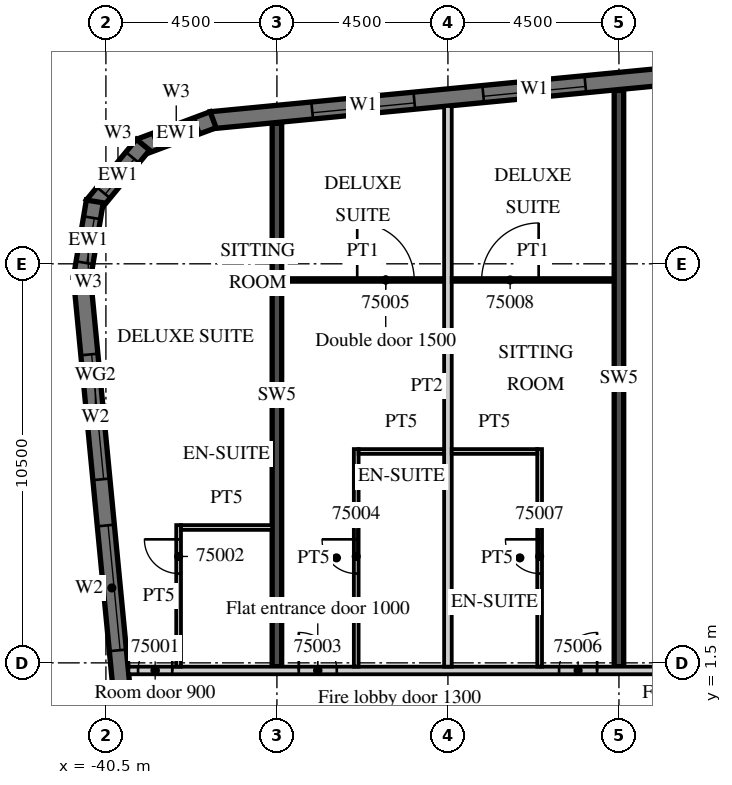
"""IFC4 building model, lengths in metres.
Left out: names, types, materials, properties, quantities, classifications, styles, units other than length and angle.
Written with IfcOpenShell. Run it as: python <this file> out.ifc"""

import sys

from ifc_helpers import new_model, si_unit, direction, frame, frame_2d, origin, place, context, subcontext, project, spatial, polyline, rectangle, outline, extrude, element, fill, save


model = new_model("IFC4")
c1 = context("Model", 3, precision=1e-05, world=origin(), true_north=direction((0.0, 1.0)))
c2 = subcontext(c1, "Body", "Model", "MODEL_VIEW")
j1 = project(units=[si_unit("LENGTHUNIT", "METRE"), si_unit("PLANEANGLEUNIT", "RADIAN")], contexts=[c1])
p1 = place(None, origin())
s1 = spatial("IfcSite", under=j1, at=p1, CompositionType="ELEMENT")
p2 = place(p1, origin())
s2 = spatial("IfcBuilding", under=s1, at=p2, CompositionType="ELEMENT")
p3 = place(p2, frame((0.0, 0.0, 298.2)))
s3 = spatial("IfcBuildingStorey", under=s2, at=p3, CompositionType="ELEMENT", Elevation=298.2)
p4 = place(p3, frame((-36.0, 1.4, 0.0), z_axis=(0.0, 0.0, 1.0), x_axis=(0.0, 1.0, 0.0)))
e1 = element("IfcWall", 1, at=p4, inside=s3, PredefinedType="SHEAR", context=c2, shape_type="SweptSolid", body=[
    extrude(rectangle(XDim=14.296, YDim=0.25, at=frame_2d((7.148, 0.0))), origin(), (0.0, 0.0, 1.0), 3.3),
])
p5 = place(p3, frame((-27.0, 1.4, 0.0), z_axis=(0.0, 0.0, 1.0), x_axis=(0.0, 1.0, 0.0)))
e2 = element("IfcWall", 2, at=p5, inside=s3, PredefinedType="SHEAR", context=c2, shape_type="SweptSolid", body=[
    extrude(rectangle(XDim=15.163, YDim=0.25, at=frame_2d((7.582, 0.0))), origin(), (0.0, 0.0, 1.0), 3.3),
])
p6 = place(p3, frame((-41.132, 11.658, 0.0), z_axis=(0.0, 0.0, 1.0), x_axis=(0.095847749461, -0.995396006082, 0.0)))
e3 = element("IfcWall", 3, at=p6, inside=s3, PredefinedType="SOLIDWALL", context=c2, shape_type="SweptSolid", body=[
    extrude(rectangle(XDim=32.0, YDim=0.45, at=frame_2d((16.0, 0.0))), origin(), (0.0, 0.0, 1.0), 3.02),
])
p7 = place(p6, frame((2.053, 0.0, 0.45)))
e4 = element("IfcOpeningElement", 4, at=p7, cuts=e3, PredefinedType="OPENING", context=c2, shape_type="SweptSolid", body=[
    extrude(rectangle(XDim=3.3, YDim=2.25, at=frame_2d((1.65, 1.125))), frame((0.0, 0.235, 0.0), z_axis=(0.0, -1.0, 0.0), x_axis=(1.0, 0.0, 0.0)), (0.0, 0.0, 1.0), 0.47),
])
p8 = place(p6, frame((6.574, 0.0, 0.45)))
e5 = element("IfcOpeningElement", 5, at=p8, cuts=e3, PredefinedType="OPENING", context=c2, shape_type="SweptSolid", body=[
    extrude(rectangle(XDim=3.3, YDim=2.25, at=frame_2d((1.65, 1.125))), frame((0.0, 0.235, 0.0), z_axis=(0.0, -1.0, 0.0), x_axis=(1.0, 0.0, 0.0)), (0.0, 0.0, 1.0), 0.47),
])
p9 = place(p3, frame((13.521, 20.713, 0.0), z_axis=(0.0, 0.0, 1.0), x_axis=(-0.995396277313, -0.095844932638, 0.0)))
e6 = element("IfcWall", 6, at=p9, inside=s3, PredefinedType="SOLIDWALL", context=c2, shape_type="SweptSolid", body=[
    extrude(rectangle(XDim=51.495, YDim=0.45, at=frame_2d((25.748, 0.0))), origin(), (0.0, 0.0, 1.0), 3.02),
])
p10 = place(p9, frame((0.91, 0.0, 0.45)))
e7 = element("IfcOpeningElement", 7, at=p10, cuts=e6, PredefinedType="OPENING", context=c2, shape_type="SweptSolid", body=[
    extrude(rectangle(XDim=2.7, YDim=2.25, at=frame_2d((1.35, 1.125))), frame((0.0, 0.235, 0.0), z_axis=(0.0, -1.0, 0.0), x_axis=(1.0, 0.0, 0.0)), (0.0, 0.0, 1.0), 0.47),
])
p11 = place(p9, frame((5.431, 0.0, 0.45)))
e8 = element("IfcOpeningElement", 8, at=p11, cuts=e6, PredefinedType="OPENING", context=c2, shape_type="SweptSolid", body=[
    extrude(rectangle(XDim=2.7, YDim=2.25, at=frame_2d((1.35, 1.125))), frame((0.0, 0.235, 0.0), z_axis=(0.0, -1.0, 0.0), x_axis=(1.0, 0.0, 0.0)), (0.0, 0.0, 1.0), 0.47),
])
p12 = place(p9, frame((9.952, 0.0, 0.45)))
e9 = element("IfcOpeningElement", 9, at=p12, cuts=e6, PredefinedType="OPENING", context=c2, shape_type="SweptSolid", body=[
    extrude(rectangle(XDim=2.7, YDim=2.25, at=frame_2d((1.35, 1.125))), frame((0.0, 0.235, 0.0), z_axis=(0.0, -1.0, 0.0), x_axis=(1.0, 0.0, 0.0)), (0.0, 0.0, 1.0), 0.47),
])
p13 = place(p9, frame((14.473, 0.0, 0.45)))
e10 = element("IfcOpeningElement", 10, at=p13, cuts=e6, PredefinedType="OPENING", context=c2, shape_type="SweptSolid", body=[
    extrude(rectangle(XDim=2.7, YDim=2.25, at=frame_2d((1.35, 1.125))), frame((0.0, 0.235, 0.0), z_axis=(0.0, -1.0, 0.0), x_axis=(1.0, 0.0, 0.0)), (0.0, 0.0, 1.0), 0.47),
])
p14 = place(p9, frame((18.994, 0.0, 0.45)))
e11 = element("IfcOpeningElement", 11, at=p14, cuts=e6, PredefinedType="OPENING", context=c2, shape_type="SweptSolid", body=[
    extrude(rectangle(XDim=2.7, YDim=2.25, at=frame_2d((1.35, 1.125))), frame((0.0, 0.235, 0.0), z_axis=(0.0, -1.0, 0.0), x_axis=(1.0, 0.0, 0.0)), (0.0, 0.0, 1.0), 0.47),
])
p15 = place(p9, frame((23.514, 0.0, 0.45)))
e12 = element("IfcOpeningElement", 12, at=p15, cuts=e6, PredefinedType="OPENING", context=c2, shape_type="SweptSolid", body=[
    extrude(rectangle(XDim=2.7, YDim=2.25, at=frame_2d((1.35, 1.125))), frame((0.0, 0.235, 0.0), z_axis=(0.0, -1.0, 0.0), x_axis=(1.0, 0.0, 0.0)), (0.0, 0.0, 1.0), 0.47),
])
p16 = place(p9, frame((28.035, 0.0, 0.45)))
e13 = element("IfcOpeningElement", 13, at=p16, cuts=e6, PredefinedType="OPENING", context=c2, shape_type="SweptSolid", body=[
    extrude(rectangle(XDim=2.7, YDim=2.25, at=frame_2d((1.35, 1.125))), frame((0.0, 0.235, 0.0), z_axis=(0.0, -1.0, 0.0), x_axis=(1.0, 0.0, 0.0)), (0.0, 0.0, 1.0), 0.47),
])
p17 = place(p9, frame((32.556, 0.0, 0.45)))
e14 = element("IfcOpeningElement", 14, at=p17, cuts=e6, PredefinedType="OPENING", context=c2, shape_type="SweptSolid", body=[
    extrude(rectangle(XDim=2.7, YDim=2.25, at=frame_2d((1.35, 1.125))), frame((0.0, 0.235, 0.0), z_axis=(0.0, -1.0, 0.0), x_axis=(1.0, 0.0, 0.0)), (0.0, 0.0, 1.0), 0.47),
])
p18 = place(p9, frame((37.077, 0.0, 0.45)))
e15 = element("IfcOpeningElement", 15, at=p18, cuts=e6, PredefinedType="OPENING", context=c2, shape_type="SweptSolid", body=[
    extrude(rectangle(XDim=2.7, YDim=2.25, at=frame_2d((1.35, 1.125))), frame((0.0, 0.235, 0.0), z_axis=(0.0, -1.0, 0.0), x_axis=(1.0, 0.0, 0.0)), (0.0, 0.0, 1.0), 0.47),
])
p19 = place(p9, frame((41.598, 0.0, 0.45)))
e16 = element("IfcOpeningElement", 16, at=p19, cuts=e6, PredefinedType="OPENING", context=c2, shape_type="SweptSolid", body=[
    extrude(rectangle(XDim=2.7, YDim=2.25, at=frame_2d((1.35, 1.125))), frame((0.0, 0.235, 0.0), z_axis=(0.0, -1.0, 0.0), x_axis=(1.0, 0.0, 0.0)), (0.0, 0.0, 1.0), 0.47),
])
p20 = place(p9, frame((46.118, 0.0, 0.45)))
e17 = element("IfcOpeningElement", 17, at=p20, cuts=e6, PredefinedType="OPENING", context=c2, shape_type="SweptSolid", body=[
    extrude(rectangle(XDim=2.7, YDim=2.25, at=frame_2d((1.35, 1.125))), frame((0.0, 0.235, 0.0), z_axis=(0.0, -1.0, 0.0), x_axis=(1.0, 0.0, 0.0)), (0.0, 0.0, 1.0), 0.47),
])
p21 = place(p3, frame((-37.679, 15.791, 0.0), z_axis=(0.0, 0.0, 1.0), x_axis=(-0.936677599948, -0.350192909346, 0.0)))
e18 = element("IfcWall", 18, at=p21, inside=s3, PredefinedType="SOLIDWALL", context=c2, shape_type="SweptSolid", body=[
    extrude(outline(polyline([(0.0, -0.225), (2.071, -0.225), (1.95, 0.225), (0.121, 0.225), (0.0, -0.225)])), origin(), (0.0, 0.0, 1.0), 3.02),
])
p22 = place(p21, frame((0.435, 0.0, 0.45)))
e19 = element("IfcOpeningElement", 19, at=p22, cuts=e18, PredefinedType="OPENING", context=c2, shape_type="SweptSolid", body=[
    extrude(rectangle(XDim=1.2, YDim=2.25, at=frame_2d((0.6, 1.125))), frame((0.0, 0.235, 0.0), z_axis=(0.0, -1.0, 0.0), x_axis=(1.0, 0.0, 0.0)), (0.0, 0.0, 1.0), 0.47),
])
p23 = place(p3, frame((-39.524, 15.133, 0.0), z_axis=(0.0, 0.0, 1.0), x_axis=(-0.636046112757, -0.771651049663, 0.0)))
e20 = element("IfcWall", 20, at=p23, inside=s3, PredefinedType="SOLIDWALL", context=c2, shape_type="SweptSolid", body=[
    extrude(outline(polyline([(0.0, -0.225), (2.071, -0.225), (1.95, 0.225), (0.121, 0.225), (0.0, -0.225)])), origin(), (0.0, 0.0, 1.0), 3.02),
])
p24 = place(p23, frame((0.435, 0.0, 0.45)))
e21 = element("IfcOpeningElement", 21, at=p24, cuts=e20, PredefinedType="OPENING", context=c2, shape_type="SweptSolid", body=[
    extrude(rectangle(XDim=1.2, YDim=2.25, at=frame_2d((0.6, 1.125))), frame((0.0, 0.235, 0.0), z_axis=(0.0, -1.0, 0.0), x_axis=(1.0, 0.0, 0.0)), (0.0, 0.0, 1.0), 0.47),
])
p25 = place(p3, frame((-40.792, 13.641, 0.0), z_axis=(0.0, 0.0, 1.0), x_axis=(-0.165068144653, -0.986282164302, 0.0)))
e22 = element("IfcWall", 22, at=p25, inside=s3, PredefinedType="SOLIDWALL", context=c2, shape_type="SweptSolid", body=[
    extrude(outline(polyline([(0.0, -0.225), (2.071, -0.225), (1.95, 0.225), (0.121, 0.225), (0.0, -0.225)])), origin(), (0.0, 0.0, 1.0), 3.02),
])
p26 = place(p25, frame((0.435, 0.0, 0.45)))
e23 = element("IfcOpeningElement", 23, at=p26, cuts=e22, PredefinedType="OPENING", context=c2, shape_type="SweptSolid", body=[
    extrude(rectangle(XDim=1.2, YDim=2.25, at=frame_2d((0.6, 1.125))), frame((0.0, 0.235, 0.0), z_axis=(0.0, -1.0, 0.0), x_axis=(1.0, 0.0, 0.0)), (0.0, 0.0, 1.0), 0.47),
])
p27 = place(p3, frame((-39.909, 1.3, 0.0), z_axis=(0.0, 0.0, 1.0), x_axis=(1.0, 0.0, 0.0)))
e24 = element("IfcWall", 24, at=p27, inside=s3, PredefinedType="PARTITIONING", context=c2, shape_type="SweptSolid", body=[
    extrude(rectangle(XDim=53.409, YDim=0.2, at=frame_2d((26.705, 0.0))), origin(), (0.0, 0.0, 1.0), 3.02),
])
p28 = place(p27, frame((0.255, 0.0, 0.0)))
e25 = element("IfcOpeningElement", 25, at=p28, cuts=e24, PredefinedType="OPENING", context=c2, shape_type="SweptSolid", body=[
    extrude(rectangle(XDim=0.9, YDim=2.1, at=frame_2d((0.45, 1.05))), frame((0.0, 0.11, 0.0), z_axis=(0.0, -1.0, 0.0), x_axis=(1.0, 0.0, 0.0)), (0.0, 0.0, 1.0), 0.22),
])
p29 = place(p27, frame((4.484, 0.0, 0.0)))
e26 = element("IfcOpeningElement", 26, at=p29, cuts=e24, PredefinedType="OPENING", context=c2, shape_type="SweptSolid", body=[
    extrude(rectangle(XDim=1.0, YDim=2.1, at=frame_2d((0.5, 1.05))), frame((0.0, 0.11, 0.0), z_axis=(0.0, -1.0, 0.0), x_axis=(1.0, 0.0, 0.0)), (0.0, 0.0, 1.0), 0.22),
])
p30 = place(p27, frame((11.334, 0.0, 0.0)))
e27 = element("IfcOpeningElement", 27, at=p30, cuts=e24, PredefinedType="OPENING", context=c2, shape_type="SweptSolid", body=[
    extrude(rectangle(XDim=1.0, YDim=2.1, at=frame_2d((0.5, 1.05))), frame((0.0, 0.11, 0.0), z_axis=(0.0, -1.0, 0.0), x_axis=(1.0, 0.0, 0.0)), (0.0, 0.0, 1.0), 0.22),
])
p31 = place(p27, frame((15.347, 0.0, 0.0)))
e28 = element("IfcOpeningElement", 28, at=p31, cuts=e24, PredefinedType="OPENING", context=c2, shape_type="SweptSolid", body=[
    extrude(rectangle(XDim=1.2, YDim=2.1, at=frame_2d((0.6, 1.05))), frame((0.0, 0.11, 0.0), z_axis=(0.0, -1.0, 0.0), x_axis=(1.0, 0.0, 0.0)), (0.0, 0.0, 1.0), 0.22),
])
p32 = place(p27, frame((24.859, 0.0, 0.0)))
e29 = element("IfcOpeningElement", 29, at=p32, cuts=e24, PredefinedType="OPENING", context=c2, shape_type="SweptSolid", body=[
    extrude(rectangle(XDim=1.0, YDim=2.1, at=frame_2d((0.5, 1.05))), frame((0.0, 0.11, 0.0), z_axis=(0.0, -1.0, 0.0), x_axis=(1.0, 0.0, 0.0)), (0.0, 0.0, 1.0), 0.22),
])
p33 = place(p27, frame((26.959, 0.0, 0.0)))
e30 = element("IfcOpeningElement", 30, at=p33, cuts=e24, PredefinedType="OPENING", context=c2, shape_type="SweptSolid", body=[
    extrude(rectangle(XDim=1.0, YDim=2.1, at=frame_2d((0.5, 1.05))), frame((0.0, 0.11, 0.0), z_axis=(0.0, -1.0, 0.0), x_axis=(1.0, 0.0, 0.0)), (0.0, 0.0, 1.0), 0.22),
])
p34 = place(p27, frame((33.346, 0.0, 0.0)))
e31 = element("IfcOpeningElement", 31, at=p34, cuts=e24, PredefinedType="OPENING", context=c2, shape_type="SweptSolid", body=[
    extrude(rectangle(XDim=1.2, YDim=2.1, at=frame_2d((0.6, 1.05))), frame((0.0, 0.11, 0.0), z_axis=(0.0, -1.0, 0.0), x_axis=(1.0, 0.0, 0.0)), (0.0, 0.0, 1.0), 0.22),
])
p35 = place(p27, frame((42.859, 0.0, 0.0)))
e32 = element("IfcOpeningElement", 32, at=p35, cuts=e24, PredefinedType="OPENING", context=c2, shape_type="SweptSolid", body=[
    extrude(rectangle(XDim=1.0, YDim=2.1, at=frame_2d((0.5, 1.05))), frame((0.0, 0.11, 0.0), z_axis=(0.0, -1.0, 0.0), x_axis=(1.0, 0.0, 0.0)), (0.0, 0.0, 1.0), 0.22),
])
p36 = place(p27, frame((44.959, 0.0, 0.0)))
e33 = element("IfcOpeningElement", 33, at=p36, cuts=e24, PredefinedType="OPENING", context=c2, shape_type="SweptSolid", body=[
    extrude(rectangle(XDim=1.0, YDim=2.1, at=frame_2d((0.5, 1.05))), frame((0.0, 0.11, 0.0), z_axis=(0.0, -1.0, 0.0), x_axis=(1.0, 0.0, 0.0)), (0.0, 0.0, 1.0), 0.22),
])
p37 = place(p27, frame((49.484, 0.0, 0.0)))
e34 = element("IfcOpeningElement", 34, at=p37, cuts=e24, PredefinedType="OPENING", context=c2, shape_type="SweptSolid", body=[
    extrude(rectangle(XDim=1.0, YDim=2.1, at=frame_2d((0.5, 1.05))), frame((0.0, 0.11, 0.0), z_axis=(0.0, -1.0, 0.0), x_axis=(1.0, 0.0, 0.0)), (0.0, 0.0, 1.0), 0.22),
])
p38 = place(p3, frame((-38.587, 1.4, 0.0), z_axis=(0.0, 0.0, 1.0), x_axis=(0.0, 1.0, 0.0)))
e35 = element("IfcWall", 35, at=p38, inside=s3, PredefinedType="PARTITIONING", context=c2, shape_type="SweptSolid", body=[
    extrude(rectangle(XDim=3.725, YDim=0.125, at=frame_2d((1.863, 0.0))), origin(), (0.0, 0.0, 1.0), 3.02),
])
p39 = place(p38, frame((2.45, 0.0, 0.0)))
e36 = element("IfcOpeningElement", 36, at=p39, cuts=e35, PredefinedType="OPENING", context=c2, shape_type="SweptSolid", body=[
    extrude(rectangle(XDim=0.9, YDim=2.1, at=frame_2d((0.45, 1.05))), frame((0.0, 0.073, 0.0), z_axis=(0.0, -1.0, 0.0), x_axis=(1.0, 0.0, 0.0)), (0.0, 0.0, 1.0), 0.145),
])
p40 = place(p3, frame((-38.525, 5.062, 0.0), z_axis=(0.0, 0.0, 1.0), x_axis=(1.0, 0.0, 0.0)))
e37 = element("IfcWall", 37, at=p40, inside=s3, PredefinedType="PARTITIONING", context=c2, shape_type="SweptSolid", body=[
    extrude(rectangle(XDim=2.4, YDim=0.125, at=frame_2d((1.2, 0.0))), origin(), (0.0, 0.0, 1.0), 3.02),
])
p41 = place(p3, frame((-31.5, 1.4, 0.0), z_axis=(0.0, 0.0, 1.0), x_axis=(0.0, 1.0, 0.0)))
e38 = element("IfcWall", 38, at=p41, inside=s3, PredefinedType="PARTITIONING", context=c2, shape_type="SweptSolid", body=[
    extrude(rectangle(XDim=14.752, YDim=0.2, at=frame_2d((7.376, 0.0))), origin(), (0.0, 0.0, 1.0), 3.02),
])
p42 = place(p3, frame((-33.913, 1.4, 0.0), z_axis=(0.0, 0.0, 1.0), x_axis=(0.0, 1.0, 0.0)))
e39 = element("IfcWall", 39, at=p42, inside=s3, PredefinedType="PARTITIONING", context=c2, shape_type="SweptSolid", body=[
    extrude(rectangle(XDim=5.725, YDim=0.125, at=frame_2d((2.863, 0.0))), origin(), (0.0, 0.0, 1.0), 3.02),
])
p43 = place(p42, frame((2.45, 0.0, 0.0)))
e40 = element("IfcOpeningElement", 40, at=p43, cuts=e39, PredefinedType="OPENING", context=c2, shape_type="SweptSolid", body=[
    extrude(rectangle(XDim=0.9, YDim=2.1, at=frame_2d((0.45, 1.05))), frame((0.0, 0.073, 0.0), z_axis=(0.0, -1.0, 0.0), x_axis=(1.0, 0.0, 0.0)), (0.0, 0.0, 1.0), 0.145),
])
p44 = place(p3, frame((-33.85, 7.062, 0.0), z_axis=(0.0, 0.0, 1.0), x_axis=(1.0, 0.0, 0.0)))
e41 = element("IfcWall", 41, at=p44, inside=s3, PredefinedType="PARTITIONING", context=c2, shape_type="SweptSolid", body=[
    extrude(rectangle(XDim=2.25, YDim=0.125, at=frame_2d((1.125, 0.0))), origin(), (0.0, 0.0, 1.0), 3.02),
])
p45 = place(p3, frame((-35.875, 11.575, 0.0), z_axis=(0.0, 0.0, 1.0), x_axis=(1.0, 0.0, 0.0)))
e42 = element("IfcWall", 42, at=p45, inside=s3, PredefinedType="PARTITIONING", context=c2, shape_type="SweptSolid", body=[
    extrude(rectangle(XDim=4.275, YDim=0.1, at=frame_2d((2.137, 0.0))), origin(), (0.0, 0.0, 1.0), 3.02),
])
p46 = place(p45, frame((1.988, 0.0, 0.0)))
e43 = element("IfcOpeningElement", 43, at=p46, cuts=e42, PredefinedType="OPENING", context=c2, shape_type="SweptSolid", body=[
    extrude(rectangle(XDim=1.5, YDim=2.1, at=frame_2d((0.75, 1.05))), frame((0.0, 0.06, 0.0), z_axis=(0.0, -1.0, 0.0), x_axis=(1.0, 0.0, 0.0)), (0.0, 0.0, 1.0), 0.12),
])
p47 = place(p3, frame((-29.087, 1.4, 0.0), z_axis=(0.0, 0.0, 1.0), x_axis=(0.0, 1.0, 0.0)))
e44 = element("IfcWall", 44, at=p47, inside=s3, PredefinedType="PARTITIONING", context=c2, shape_type="SweptSolid", body=[
    extrude(rectangle(XDim=5.725, YDim=0.125, at=frame_2d((2.863, 0.0))), origin(), (0.0, 0.0, 1.0), 3.02),
])
p48 = place(p47, frame((2.45, 0.0, 0.0)))
e45 = element("IfcOpeningElement", 45, at=p48, cuts=e44, PredefinedType="OPENING", context=c2, shape_type="SweptSolid", body=[
    extrude(rectangle(XDim=0.9, YDim=2.1, at=frame_2d((0.45, 1.05))), frame((0.0, 0.073, 0.0), z_axis=(0.0, -1.0, 0.0), x_axis=(1.0, 0.0, 0.0)), (0.0, 0.0, 1.0), 0.145),
])
p49 = place(p3, frame((-31.4, 7.062, 0.0), z_axis=(0.0, 0.0, 1.0), x_axis=(1.0, 0.0, 0.0)))
e46 = element("IfcWall", 46, at=p49, inside=s3, PredefinedType="PARTITIONING", context=c2, shape_type="SweptSolid", body=[
    extrude(rectangle(XDim=2.25, YDim=0.125, at=frame_2d((1.125, 0.0))), origin(), (0.0, 0.0, 1.0), 3.02),
])
p50 = place(p3, frame((-31.4, 11.575, 0.0), z_axis=(0.0, 0.0, 1.0), x_axis=(1.0, 0.0, 0.0)))
e47 = element("IfcWall", 47, at=p50, inside=s3, PredefinedType="PARTITIONING", context=c2, shape_type="SweptSolid", body=[
    extrude(rectangle(XDim=4.275, YDim=0.1, at=frame_2d((2.137, 0.0))), origin(), (0.0, 0.0, 1.0), 3.02),
])
p51 = place(p50, frame((0.787, 0.0, 0.0)))
e48 = element("IfcOpeningElement", 48, at=p51, cuts=e47, PredefinedType="OPENING", context=c2, shape_type="SweptSolid", body=[
    extrude(rectangle(XDim=1.5, YDim=2.1, at=frame_2d((0.75, 1.05))), frame((0.0, 0.06, 0.0), z_axis=(0.0, -1.0, 0.0), x_axis=(1.0, 0.0, 0.0)), (0.0, 0.0, 1.0), 0.12),
])
p52 = place(p7, origin())
e49 = element("IfcWindow", 49, at=p52, inside=s3, PartitioningType="SINGLE_PANEL", PredefinedType="WINDOW", context=c2, shape_type="SweptSolid", body=[
    extrude(rectangle(XDim=3.3, YDim=2.25, at=frame_2d((1.65, 1.125))), frame((0.0, 0.09, 0.0), z_axis=(0.0, -1.0, 0.0), x_axis=(1.0, 0.0, 0.0)), (0.0, 0.0, 1.0), 0.06),
])
fill(e4, e49)
p53 = place(p8, origin())
e50 = element("IfcWindow", 50, at=p53, inside=s3, PartitioningType="SINGLE_PANEL", PredefinedType="WINDOW", context=c2, shape_type="SweptSolid", body=[
    extrude(rectangle(XDim=3.3, YDim=2.25, at=frame_2d((1.65, 1.125))), frame((0.0, 0.09, 0.0), z_axis=(0.0, -1.0, 0.0), x_axis=(1.0, 0.0, 0.0)), (0.0, 0.0, 1.0), 0.06),
])
fill(e5, e50)
p54 = place(p19, origin())
e51 = element("IfcWindow", 51, at=p54, inside=s3, PartitioningType="SINGLE_PANEL", PredefinedType="WINDOW", context=c2, shape_type="SweptSolid", body=[
    extrude(rectangle(XDim=2.7, YDim=2.25, at=frame_2d((1.35, 1.125))), frame((0.0, 0.09, 0.0), z_axis=(0.0, -1.0, 0.0), x_axis=(1.0, 0.0, 0.0)), (0.0, 0.0, 1.0), 0.06),
])
fill(e16, e51)
p55 = place(p20, origin())
e52 = element("IfcWindow", 52, at=p55, inside=s3, PartitioningType="SINGLE_PANEL", PredefinedType="WINDOW", context=c2, shape_type="SweptSolid", body=[
    extrude(rectangle(XDim=2.7, YDim=2.25, at=frame_2d((1.35, 1.125))), frame((0.0, 0.09, 0.0), z_axis=(0.0, -1.0, 0.0), x_axis=(1.0, 0.0, 0.0)), (0.0, 0.0, 1.0), 0.06),
])
fill(e17, e52)
p56 = place(p22, origin())
e53 = element("IfcWindow", 53, at=p56, inside=s3, PartitioningType="SINGLE_PANEL", PredefinedType="WINDOW", context=c2, shape_type="SweptSolid", body=[
    extrude(rectangle(XDim=1.2, YDim=2.25, at=frame_2d((0.6, 1.125))), frame((0.0, 0.09, 0.0), z_axis=(0.0, -1.0, 0.0), x_axis=(1.0, 0.0, 0.0)), (0.0, 0.0, 1.0), 0.06),
])
fill(e19, e53)
p57 = place(p24, origin())
e54 = element("IfcWindow", 54, at=p57, inside=s3, PartitioningType="SINGLE_PANEL", PredefinedType="WINDOW", context=c2, shape_type="SweptSolid", body=[
    extrude(rectangle(XDim=1.2, YDim=2.25, at=frame_2d((0.6, 1.125))), frame((0.0, 0.09, 0.0), z_axis=(0.0, -1.0, 0.0), x_axis=(1.0, 0.0, 0.0)), (0.0, 0.0, 1.0), 0.06),
])
fill(e21, e54)
p58 = place(p26, origin())
e55 = element("IfcWindow", 55, at=p58, inside=s3, PartitioningType="SINGLE_PANEL", PredefinedType="WINDOW", context=c2, shape_type="SweptSolid", body=[
    extrude(rectangle(XDim=1.2, YDim=2.25, at=frame_2d((0.6, 1.125))), frame((0.0, 0.09, 0.0), z_axis=(0.0, -1.0, 0.0), x_axis=(1.0, 0.0, 0.0)), (0.0, 0.0, 1.0), 0.06),
])
fill(e23, e55)
p59 = place(p28, origin())
e56 = element("IfcDoor", 56, at=p59, inside=s3, OperationType="SINGLE_SWING_RIGHT", PredefinedType="DOOR", context=c2, shape_type="SweptSolid", body=[
    extrude(rectangle(XDim=0.9, YDim=2.1, at=frame_2d((0.45, 1.05))), frame((0.0, 0.025, 0.0), z_axis=(0.0, -1.0, 0.0), x_axis=(1.0, 0.0, 0.0)), (0.0, 0.0, 1.0), 0.05),
])
fill(e25, e56)
p60 = place(p39, origin())
e57 = element("IfcDoor", 57, at=p60, inside=s3, OperationType="SINGLE_SWING_RIGHT", PredefinedType="DOOR", context=c2, shape_type="SweptSolid", body=[
    extrude(rectangle(XDim=0.9, YDim=2.1, at=frame_2d((0.45, 1.05))), frame((0.0, 0.025, 0.0), z_axis=(0.0, -1.0, 0.0), x_axis=(1.0, 0.0, 0.0)), (0.0, 0.0, 1.0), 0.05),
])
fill(e36, e57)
p61 = place(p29, origin())
e58 = element("IfcDoor", 58, at=p61, inside=s3, OperationType="SINGLE_SWING_LEFT", PredefinedType="DOOR", context=c2, shape_type="SweptSolid", body=[
    extrude(rectangle(XDim=1.0, YDim=2.1, at=frame_2d((0.5, 1.05))), frame((0.0, 0.025, 0.0), z_axis=(0.0, -1.0, 0.0), x_axis=(1.0, 0.0, 0.0)), (0.0, 0.0, 1.0), 0.05),
])
fill(e26, e58)
p62 = place(p43, origin())
e59 = element("IfcDoor", 59, at=p62, inside=s3, OperationType="SINGLE_SWING_RIGHT", PredefinedType="DOOR", context=c2, shape_type="SweptSolid", body=[
    extrude(rectangle(XDim=0.9, YDim=2.1, at=frame_2d((0.45, 1.05))), frame((0.0, 0.025, 0.0), z_axis=(0.0, -1.0, 0.0), x_axis=(1.0, 0.0, 0.0)), (0.0, 0.0, 1.0), 0.05),
])
fill(e40, e59)
p63 = place(p46, origin())
e60 = element("IfcDoor", 60, at=p63, inside=s3, OperationType="SINGLE_SWING_LEFT", PredefinedType="DOOR", context=c2, shape_type="SweptSolid", body=[
    extrude(rectangle(XDim=1.5, YDim=2.1, at=frame_2d((0.75, 1.05))), frame((0.0, 0.025, 0.0), z_axis=(0.0, -1.0, 0.0), x_axis=(1.0, 0.0, 0.0)), (0.0, 0.0, 1.0), 0.05),
])
fill(e43, e60)
p64 = place(p30, origin())
e61 = element("IfcDoor", 61, at=p64, inside=s3, OperationType="SINGLE_SWING_RIGHT", PredefinedType="DOOR", context=c2, shape_type="SweptSolid", body=[
    extrude(rectangle(XDim=1.0, YDim=2.1, at=frame_2d((0.5, 1.05))), frame((0.0, 0.025, 0.0), z_axis=(0.0, -1.0, 0.0), x_axis=(1.0, 0.0, 0.0)), (0.0, 0.0, 1.0), 0.05),
])
fill(e27, e61)
p65 = place(p48, origin())
e62 = element("IfcDoor", 62, at=p65, inside=s3, OperationType="SINGLE_SWING_RIGHT", PredefinedType="DOOR", context=c2, shape_type="SweptSolid", body=[
    extrude(rectangle(XDim=0.9, YDim=2.1, at=frame_2d((0.45, 1.05))), frame((0.0, 0.025, 0.0), z_axis=(0.0, -1.0, 0.0), x_axis=(1.0, 0.0, 0.0)), (0.0, 0.0, 1.0), 0.05),
])
fill(e45, e62)
p66 = place(p51, origin())
e63 = element("IfcDoor", 63, at=p66, inside=s3, OperationType="SINGLE_SWING_RIGHT", PredefinedType="DOOR", context=c2, shape_type="SweptSolid", body=[
    extrude(rectangle(XDim=1.5, YDim=2.1, at=frame_2d((0.75, 1.05))), frame((0.0, 0.025, 0.0), z_axis=(0.0, -1.0, 0.0), x_axis=(1.0, 0.0, 0.0)), (0.0, 0.0, 1.0), 0.05),
])
fill(e48, e63)
save(model, sys.argv[1])
